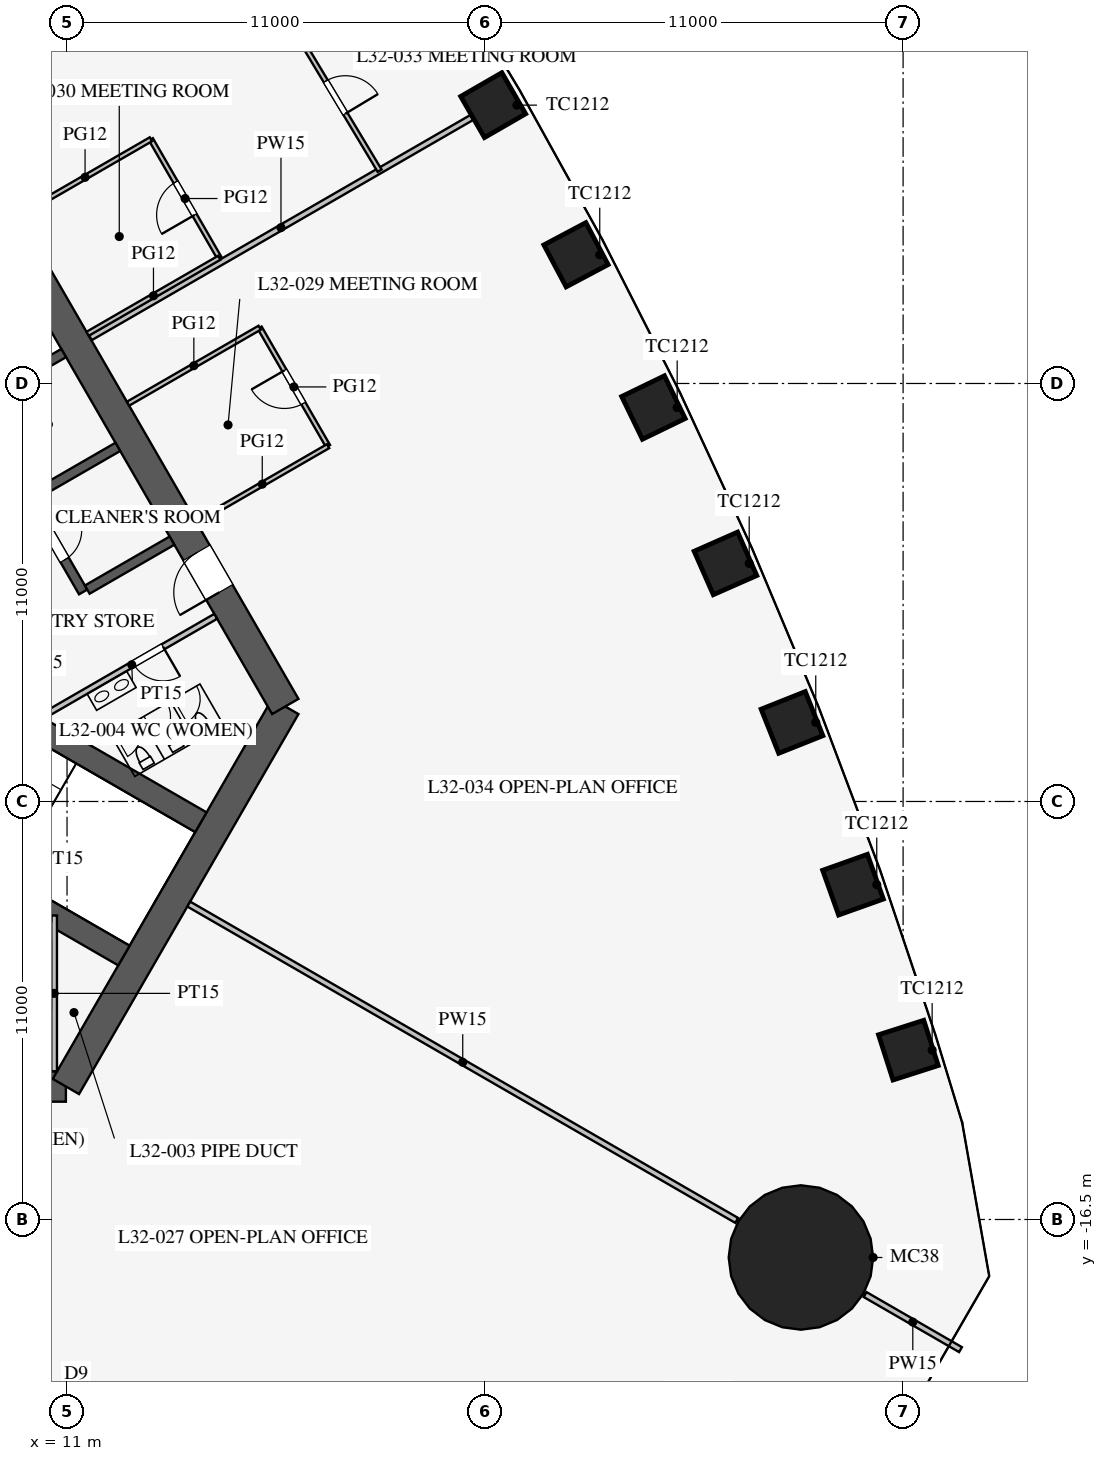
"""IFC4 building model, lengths in metres.
Left out: names, types, materials, properties, quantities, classifications, styles, units other than length and angle.
Written with IfcOpenShell. Run it as: python <this file> out.ifc"""

import sys

from ifc_helpers import new_model, si_unit, direction, frame, frame_2d, origin, origin_2d, place, context, subcontext, project, spatial, rectangle, circle, extrude, element, fill, save


model = new_model("IFC4")
c1 = context("Model", 3, precision=1e-05, world=origin(), true_north=direction((0.0, 1.0)))
c2 = subcontext(c1, "Body", "Model", "MODEL_VIEW")
j1 = project(units=[si_unit("LENGTHUNIT", "METRE"), si_unit("PLANEANGLEUNIT", "RADIAN")], contexts=[c1])
p1 = place(None, origin())
s1 = spatial("IfcSite", under=j1, at=p1, CompositionType="ELEMENT")
p2 = place(p1, origin())
s2 = spatial("IfcBuilding", under=s1, at=p2, CompositionType="ELEMENT")
p3 = place(p2, frame((0.0, 0.0, 140.9)))
s3 = spatial("IfcBuildingStorey", under=s2, at=p3, CompositionType="ELEMENT", Elevation=140.9)
for number, where, z_axis, x_axis in (
    (1, (33.139, -12.044, 0.0), (0.0, 0.0, 1.0), (-0.305, 0.952, 0.0)),
    (2, (31.682, -7.689, 0.0), (0.0, 0.0, 1.0), (-0.336, 0.942, 0.0)),
    (3, (30.077, -3.42, 0.0), (0.0, 0.0, 1.0), (-0.37, 0.929, 0.0)),
    (4, (28.325, 0.765, 0.0), (0.0, 0.0, 1.0), (-0.403, 0.915, 0.0)),
    (5, (26.43, 4.867, 0.0), (0.0, 0.0, 1.0), (-0.436, 0.9, 0.0)),
    (6, (24.393, 8.887, 0.0), (0.0, 0.0, 1.0), (-0.468, 0.883, 0.0)),
    (7, (22.213, 12.825, 0.0), (0.0, 0.0, 1.0), (-0.5, 0.866, 0.0)),
):
    element("IfcColumn", number, at=place(p3, frame(where, z_axis=z_axis, x_axis=x_axis)), inside=s3, PredefinedType="COLUMN", context=c2, shape_type="SweptSolid", body=[
        extrude(rectangle(XDim=1.25, YDim=1.25, at=origin_2d()), origin(), (0.0, 0.0, 1.0), 4.2),
    ])
p4 = place(p3, frame((30.311, -17.5, 0.0), z_axis=(0.0, 0.0, 1.0), x_axis=(1.0, 0.0, 0.0)))
e8 = element("IfcColumn", 8, at=p4, inside=s3, PredefinedType="COLUMN", context=c2, shape_type="SweptSolid", body=[
    extrude(circle(Radius=1.9, at=origin_2d()), origin(), (0.0, 0.0, 1.0), 4.2),
])
p5 = place(p3, frame((-10.97, -13.0, 0.0), z_axis=(0.0, 0.0, 1.0), x_axis=(1.0, 0.0, 0.0)))
e9 = element("IfcWall", 9, at=p5, inside=s3, PredefinedType="SHEAR", context=c2, shape_type="SweptSolid", body=[
    extrude(rectangle(XDim=21.939, YDim=0.8, at=frame_2d((10.97, 0.0))), origin(), (0.0, 0.0, 1.0), 4.2),
])
p6 = place(p5, frame((17.27, 0.0, 0.0)))
e10 = element("IfcOpeningElement", 10, at=p6, cuts=e9, PredefinedType="OPENING", context=c2, shape_type="SweptSolid", body=[
    extrude(rectangle(XDim=1.2, YDim=2.1, at=frame_2d((0.6, 1.05))), frame((0.0, 0.41, 0.0), z_axis=(0.0, -1.0, 0.0), x_axis=(1.0, 0.0, 0.0)), (0.0, 0.0, 1.0), 0.82),
])
p7 = place(p5, frame((3.47, 0.0, 0.0)))
e11 = element("IfcOpeningElement", 11, at=p7, cuts=e9, PredefinedType="OPENING", context=c2, shape_type="SweptSolid", body=[
    extrude(rectangle(XDim=1.2, YDim=2.1, at=frame_2d((0.6, 1.05))), frame((0.0, 0.41, 0.0), z_axis=(0.0, -1.0, 0.0), x_axis=(1.0, 0.0, 0.0)), (0.0, 0.0, 1.0), 0.82),
])
p8 = place(p3, frame((10.97, -13.0, 0.0), z_axis=(0.0, 0.0, 1.0), x_axis=(0.499995765644, 0.866027848477, 0.0)))
e12 = element("IfcWall", 12, at=p8, inside=s3, PredefinedType="SHEAR", context=c2, shape_type="SweptSolid", body=[
    extrude(rectangle(XDim=11.547, YDim=0.8, at=frame_2d((5.773, 0.0))), origin(), (0.0, 0.0, 1.0), 4.2),
])
p9 = place(p3, frame((16.743, -3.0, 0.0), z_axis=(0.0, 0.0, 1.0), x_axis=(-0.500002442456, 0.866023993627, 0.0)))
e13 = element("IfcWall", 13, at=p9, inside=s3, PredefinedType="SHEAR", context=c2, shape_type="SweptSolid", body=[
    extrude(rectangle(XDim=21.939, YDim=0.8, at=frame_2d((10.97, 0.0))), origin(), (0.0, 0.0, 1.0), 4.2),
])
p10 = place(p9, frame((17.27, 0.0, 0.0)))
e14 = element("IfcOpeningElement", 14, at=p10, cuts=e13, PredefinedType="OPENING", context=c2, shape_type="SweptSolid", body=[
    extrude(rectangle(XDim=1.2, YDim=2.1, at=frame_2d((0.6, 1.05))), frame((0.0, 0.41, 0.0), z_axis=(0.0, -1.0, 0.0), x_axis=(1.0, 0.0, 0.0)), (0.0, 0.0, 1.0), 0.82),
])
p11 = place(p9, frame((3.47, 0.0, 0.0)))
e15 = element("IfcOpeningElement", 15, at=p11, cuts=e13, PredefinedType="OPENING", context=c2, shape_type="SweptSolid", body=[
    extrude(rectangle(XDim=1.2, YDim=2.1, at=frame_2d((0.6, 1.05))), frame((0.0, 0.41, 0.0), z_axis=(0.0, -1.0, 0.0), x_axis=(1.0, 0.0, 0.0)), (0.0, 0.0, 1.0), 0.82),
])
p12 = place(p3, frame((11.424, 0.014, 0.0), z_axis=(0.0, 0.0, 1.0), x_axis=(-0.500001763848, 0.866024385424, 0.0)))
e16 = element("IfcWall", 16, at=p12, inside=s3, PredefinedType="SHEAR", context=c2, shape_type="SweptSolid", body=[
    extrude(rectangle(XDim=11.4, YDim=0.25, at=frame_2d((5.7, 0.0))), origin(), (0.0, 0.0, 1.0), 4.2),
])
p13 = place(p12, frame((0.975, 0.0, 0.0)))
e17 = element("IfcOpeningElement", 17, at=p13, cuts=e16, PredefinedType="OPENING", context=c2, shape_type="SweptSolid", body=[
    extrude(rectangle(XDim=0.9, YDim=2.1, at=frame_2d((0.45, 1.05))), frame((0.0, 0.135, 0.0), z_axis=(0.0, -1.0, 0.0), x_axis=(1.0, 0.0, 0.0)), (0.0, 0.0, 1.0), 0.27),
])
p14 = place(p12, frame((3.825, 0.0, 0.0)))
e18 = element("IfcOpeningElement", 18, at=p14, cuts=e16, PredefinedType="OPENING", context=c2, shape_type="SweptSolid", body=[
    extrude(rectangle(XDim=0.9, YDim=2.1, at=frame_2d((0.45, 1.05))), frame((0.0, 0.135, 0.0), z_axis=(0.0, -1.0, 0.0), x_axis=(1.0, 0.0, 0.0)), (0.0, 0.0, 1.0), 0.27),
])
for number, where, z_axis, x_axis in (
    (19, (11.532, 0.076, 0.0), (0.0, 0.0, 1.0), (0.866, 0.5, 0.0)),
    (20, (10.107, 2.544, 0.0), (0.0, 0.0, 1.0), (0.866, 0.5, 0.0)),
    (21, (8.682, 5.012, 0.0), (0.0, 0.0, 1.0), (0.866, 0.5, 0.0)),
):
    element("IfcWall", number, at=place(p3, frame(where, z_axis=z_axis, x_axis=x_axis)), inside=s3, PredefinedType="SHEAR", context=c2, shape_type="SweptSolid", body=[
        extrude(rectangle(XDim=2.575, YDim=0.25, at=frame_2d((1.288, 0.0))), origin(), (0.0, 0.0, 1.0), 4.2),
    ])
for number, where, z_axis, x_axis in (
    (22, (4.638, -5.016, 0.0), (0.0, 0.0, 1.0), (0.866, -0.5, 0.0)),
    (23, (6.663, -1.509, 0.0), (0.0, 0.0, 1.0), (0.866, -0.5, 0.0)),
):
    element("IfcWall", number, at=place(p3, frame(where, z_axis=z_axis, x_axis=x_axis)), inside=s3, PredefinedType="SHEAR", context=c2, shape_type="SweptSolid", body=[
        extrude(rectangle(XDim=9.075, YDim=0.6, at=frame_2d((4.538, 0.0))), origin(), (0.0, 0.0, 1.0), 4.2),
    ])
p15 = place(p3, frame((10.495, -3.178, 0.0), z_axis=(0.0, 0.0, 1.0), x_axis=(0.86602216432, 0.500005610874, 0.0)))
e24 = element("IfcWall", 24, at=p15, inside=s3, PredefinedType="PARTITIONING", context=c2, shape_type="SweptSolid", body=[
    extrude(rectangle(XDim=5.1, YDim=0.15, at=frame_2d((2.55, 0.0))), origin(), (0.0, 0.0, 1.0), 4.0),
])
p16 = place(p15, frame((2.6, 0.0, 0.0)))
e25 = element("IfcOpeningElement", 25, at=p16, cuts=e24, PredefinedType="OPENING", context=c2, shape_type="SweptSolid", body=[
    extrude(rectangle(XDim=0.9, YDim=2.1, at=frame_2d((0.45, 1.05))), frame((0.0, 0.085, 0.0), z_axis=(0.0, -1.0, 0.0), x_axis=(1.0, 0.0, 0.0)), (0.0, 0.0, 1.0), 0.17),
])
p17 = place(p3, frame((10.66, -8.5, 0.0), z_axis=(0.0, 0.0, 1.0), x_axis=(0.0, -1.0, 0.0)))
e26 = element("IfcWall", 26, at=p17, inside=s3, PredefinedType="PARTITIONING", context=c2, shape_type="SweptSolid", body=[
    extrude(rectangle(XDim=4.1, YDim=0.15, at=frame_2d((2.05, 0.0))), origin(), (0.0, 0.0, 1.0), 4.0),
])
p18 = place(p3, frame((14.203, -8.2, 0.0), z_axis=(0.0, 0.0, 1.0), x_axis=(0.866024668836, -0.500001272966, 0.0)))
e27 = element("IfcWall", 27, at=p18, inside=s3, PredefinedType="PARTITIONING", context=c2, shape_type="SweptSolid", body=[
    extrude(rectangle(XDim=16.65, YDim=0.15, at=frame_2d((8.325, 0.0))), origin(), (0.0, 0.0, 1.0), 2.3),
])
p19 = place(p3, frame((32.0, -18.475, 0.0), z_axis=(0.0, 0.0, 1.0), x_axis=(0.866042548026, -0.499970304126, 0.0)))
e28 = element("IfcWall", 28, at=p19, inside=s3, PredefinedType="PARTITIONING", context=c2, shape_type="SweptSolid", body=[
    extrude(rectangle(XDim=2.899, YDim=0.15, at=frame_2d((1.45, 0.0))), origin(), (0.0, 0.0, 1.0), 2.3),
])
p20 = place(p3, frame((11.613, 6.705, 0.0), z_axis=(0.0, 0.0, 1.0), x_axis=(0.866031170684, 0.499990011303, 0.0)))
e29 = element("IfcWall", 29, at=p20, inside=s3, PredefinedType="PARTITIONING", context=c2, shape_type="SweptSolid", body=[
    extrude(rectangle(XDim=11.585, YDim=0.15, at=frame_2d((5.792, 0.0))), origin(), (0.0, 0.0, 1.0), 3.2),
])
p21 = place(p3, frame((15.006, 8.808, 0.0), z_axis=(0.0, 0.0, 1.0), x_axis=(-0.500012057535, 0.866018442252, 0.0)))
e30 = element("IfcWall", 30, at=p21, inside=s3, PredefinedType="PARTITIONING", context=c2, shape_type="SweptSolid", body=[
    extrude(rectangle(XDim=3.6, YDim=0.12, at=frame_2d((1.8, 0.0))), origin(), (0.0, 0.0, 1.0), 2.9),
])
p22 = place(p21, frame((1.3, 0.0, 0.15)))
e31 = element("IfcOpeningElement", 31, at=p22, cuts=e30, PredefinedType="OPENING", context=c2, shape_type="SweptSolid", body=[
    extrude(rectangle(XDim=1.0, YDim=2.1, at=frame_2d((0.5, 1.05))), frame((0.0, 0.07, 0.0), z_axis=(0.0, -1.0, 0.0), x_axis=(1.0, 0.0, 0.0)), (0.0, 0.0, 1.0), 0.14),
])
p23 = place(p3, frame((17.869, 3.85, 0.0), z_axis=(0.0, 0.0, 1.0), x_axis=(-0.500012057535, 0.866018442252, 0.0)))
e32 = element("IfcWall", 32, at=p23, inside=s3, PredefinedType="PARTITIONING", context=c2, shape_type="SweptSolid", body=[
    extrude(rectangle(XDim=3.6, YDim=0.12, at=frame_2d((1.8, 0.0))), origin(), (0.0, 0.0, 1.0), 2.9),
])
p24 = place(p23, frame((1.3, 0.0, 0.15)))
e33 = element("IfcOpeningElement", 33, at=p24, cuts=e32, PredefinedType="OPENING", context=c2, shape_type="SweptSolid", body=[
    extrude(rectangle(XDim=1.0, YDim=2.1, at=frame_2d((0.5, 1.05))), frame((0.0, 0.07, 0.0), z_axis=(0.0, -1.0, 0.0), x_axis=(1.0, 0.0, 0.0)), (0.0, 0.0, 1.0), 0.14),
])
for number, where, z_axis, x_axis in (
    (34, (11.542, 6.808, 0.0), (0.0, 0.0, 1.0), (0.866, 0.5, 0.0)),
    (35, (9.742, 9.926, 0.0), (0.0, 0.0, 1.0), (0.866, 0.5, 0.0)),
    (36, (12.605, 4.968, 0.0), (0.0, 0.0, 1.0), (0.866, 0.5, 0.0)),
    (37, (14.405, 1.85, 0.0), (0.0, 0.0, 1.0), (0.866, 0.5, 0.0)),
):
    element("IfcWall", number, at=place(p3, frame(where, z_axis=z_axis, x_axis=x_axis)), inside=s3, PredefinedType="PARTITIONING", context=c2, shape_type="SweptSolid", body=[
        extrude(rectangle(XDim=4.0, YDim=0.12, at=frame_2d((2.0, 0.0))), origin(), (0.0, 0.0, 1.0), 2.9),
    ])
p25 = place(p3, frame((19.226, 11.1, 0.0), z_axis=(0.0, 0.0, 1.0), x_axis=(-0.515548366618, 0.856860479703, 0.0)))
e38 = element("IfcWall", 38, at=p25, inside=s3, PredefinedType="PARTITIONING", context=c2, shape_type="SweptSolid", body=[
    extrude(rectangle(XDim=4.501, YDim=0.12, at=frame_2d((2.25, 0.0))), origin(), (0.0, 0.0, 1.0), 2.9),
])
p26 = place(p25, frame((1.75, 0.0, 0.15)))
e39 = element("IfcOpeningElement", 39, at=p26, cuts=e38, PredefinedType="OPENING", context=c2, shape_type="SweptSolid", body=[
    extrude(rectangle(XDim=1.0, YDim=2.1, at=frame_2d((0.5, 1.05))), frame((0.0, 0.07, 0.0), z_axis=(0.0, -1.0, 0.0), x_axis=(1.0, 0.0, 0.0)), (0.0, 0.0, 1.0), 0.14),
])
p27 = place(p16, frame((0.9, 0.0, 0.0), z_axis=(0.0, 0.0, 1.0), x_axis=(-1.0, 0.0, 0.0)))
e40 = element("IfcDoor", 40, at=p27, inside=s3, OperationType="SINGLE_SWING_LEFT", PredefinedType="DOOR", context=c2, shape_type="SweptSolid", body=[
    extrude(rectangle(XDim=0.9, YDim=2.1, at=frame_2d((0.45, 1.05))), frame((0.0, 0.025, 0.0), z_axis=(0.0, -1.0, 0.0), x_axis=(1.0, 0.0, 0.0)), (0.0, 0.0, 1.0), 0.05),
])
fill(e25, e40)
p28 = place(p11, origin())
e41 = element("IfcDoor", 41, at=p28, inside=s3, OperationType="SINGLE_SWING_LEFT", PredefinedType="DOOR", context=c2, shape_type="SweptSolid", body=[
    extrude(rectangle(XDim=1.2, YDim=2.1, at=frame_2d((0.6, 1.05))), frame((0.0, 0.025, 0.0), z_axis=(0.0, -1.0, 0.0), x_axis=(1.0, 0.0, 0.0)), (0.0, 0.0, 1.0), 0.05),
])
fill(e15, e41)
p29 = place(p13, frame((0.9, 0.0, 0.0), z_axis=(0.0, 0.0, 1.0), x_axis=(-1.0, 0.0, 0.0)))
e42 = element("IfcDoor", 42, at=p29, inside=s3, OperationType="SINGLE_SWING_LEFT", PredefinedType="DOOR", context=c2, shape_type="SweptSolid", body=[
    extrude(rectangle(XDim=0.9, YDim=2.1, at=frame_2d((0.45, 1.05))), frame((0.0, 0.025, 0.0), z_axis=(0.0, -1.0, 0.0), x_axis=(1.0, 0.0, 0.0)), (0.0, 0.0, 1.0), 0.05),
])
fill(e17, e42)
p30 = place(p24, origin())
e43 = element("IfcDoor", 43, at=p30, inside=s3, OperationType="SINGLE_SWING_RIGHT", PredefinedType="DOOR", context=c2, shape_type="SweptSolid", body=[
    extrude(rectangle(XDim=1.0, YDim=2.1, at=frame_2d((0.5, 1.05))), frame((0.0, 0.025, 0.0), z_axis=(0.0, -1.0, 0.0), x_axis=(1.0, 0.0, 0.0)), (0.0, 0.0, 1.0), 0.05),
])
fill(e33, e43)
p31 = place(p22, origin())
e44 = element("IfcDoor", 44, at=p31, inside=s3, OperationType="SINGLE_SWING_LEFT", PredefinedType="DOOR", context=c2, shape_type="SweptSolid", body=[
    extrude(rectangle(XDim=1.0, YDim=2.1, at=frame_2d((0.5, 1.05))), frame((0.0, 0.025, 0.0), z_axis=(0.0, -1.0, 0.0), x_axis=(1.0, 0.0, 0.0)), (0.0, 0.0, 1.0), 0.05),
])
fill(e31, e44)
p32 = place(p26, frame((1.0, 0.0, 0.0), z_axis=(0.0, 0.0, 1.0), x_axis=(-1.0, 0.0, 0.0)))
e45 = element("IfcDoor", 45, at=p32, inside=s3, OperationType="SINGLE_SWING_RIGHT", PredefinedType="DOOR", context=c2, shape_type="SweptSolid", body=[
    extrude(rectangle(XDim=1.0, YDim=2.1, at=frame_2d((0.5, 1.05))), frame((0.0, 0.025, 0.0), z_axis=(0.0, -1.0, 0.0), x_axis=(1.0, 0.0, 0.0)), (0.0, 0.0, 1.0), 0.05),
])
fill(e39, e45)
save(model, sys.argv[1])
